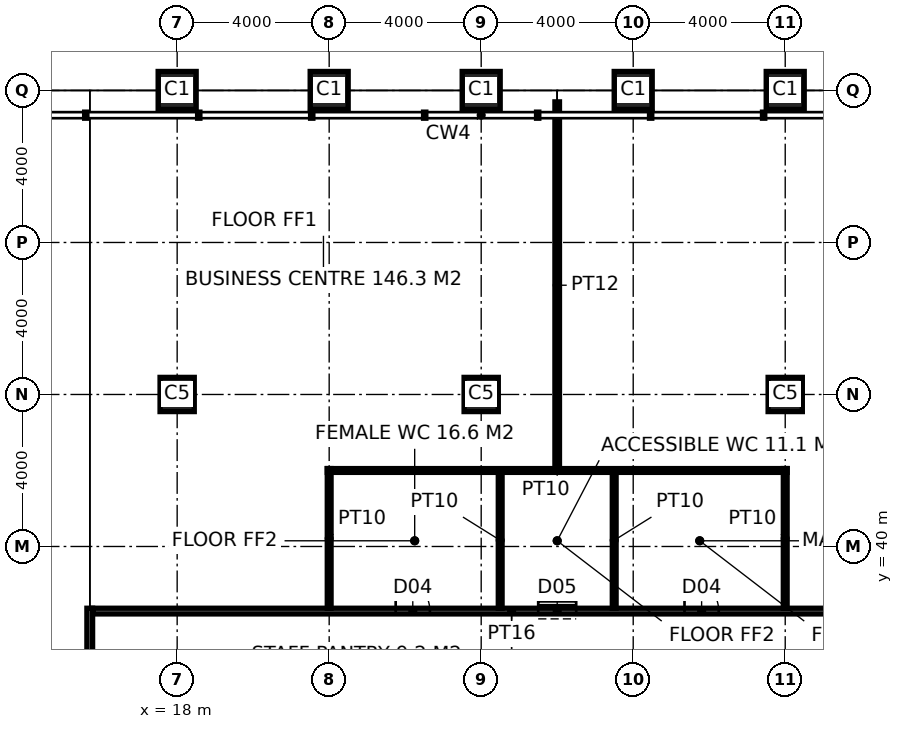
"""IFC4 building model, lengths in metres.
Left out: names, types, materials, properties, quantities, classifications, styles, units other than length and angle.
Written with IfcOpenShell. Run it as: python <this file> out.ifc"""

import sys

from ifc_helpers import new_model, si_unit, direction, frame, frame_2d, origin, origin_2d, place, context, subcontext, project, spatial, rectangle, hollow_rectangle, extrude, element, fill, save


model = new_model("IFC4")
c1 = context("Model", 3, precision=1e-05, world=origin(), true_north=direction((0.0, 1.0)))
c2 = subcontext(c1, "Body", "Model", "MODEL_VIEW")
j1 = project(units=[si_unit("LENGTHUNIT", "METRE"), si_unit("PLANEANGLEUNIT", "RADIAN")], contexts=[c1])
p1 = place(None, origin())
s1 = spatial("IfcSite", under=j1, at=p1, CompositionType="ELEMENT")
p2 = place(p1, origin())
s2 = spatial("IfcBuilding", under=s1, at=p2, CompositionType="ELEMENT")
p3 = place(p2, frame((0.0, 0.0, 142.8)))
s3 = spatial("IfcBuildingStorey", under=s2, at=p3, CompositionType="ELEMENT", Elevation=142.8)
for number, where, z_axis, x_axis in (
    (1, (18.0, 52.0, 0.0), (0.0, 0.0, 1.0), (1.0, 0.0, 0.0)),
    (2, (22.0, 52.0, 0.0), (0.0, 0.0, 1.0), (1.0, 0.0, 0.0)),
    (3, (26.0, 52.0, 0.0), (0.0, 0.0, 1.0), (1.0, 0.0, 0.0)),
    (4, (30.0, 52.0, 0.0), (0.0, 0.0, 1.0), (1.0, 0.0, 0.0)),
    (5, (34.0, 52.0, 0.0), (0.0, 0.0, 1.0), (1.0, 0.0, 0.0)),
):
    element("IfcColumn", number, at=place(p3, frame(where, z_axis=z_axis, x_axis=x_axis)), inside=s3, PredefinedType="COLUMN", context=c2, shape_type="SweptSolid", body=[
        extrude(hollow_rectangle(XDim=1.0, YDim=1.0, WallThickness=0.1, at=origin_2d()), origin(), (0.0, 0.0, 1.0), 5.0),
    ])
for number, where, z_axis, x_axis in (
    (6, (18.0, 44.0, 0.0), (0.0, 0.0, 1.0), (1.0, 0.0, 0.0)),
    (7, (26.0, 44.0, 0.0), (0.0, 0.0, 1.0), (1.0, 0.0, 0.0)),
    (8, (34.0, 44.0, 0.0), (0.0, 0.0, 1.0), (1.0, 0.0, 0.0)),
):
    element("IfcColumn", number, at=place(p3, frame(where, z_axis=z_axis, x_axis=x_axis)), inside=s3, PredefinedType="COLUMN", context=c2, shape_type="SweptSolid", body=[
        extrude(hollow_rectangle(XDim=0.9, YDim=0.9, WallThickness=0.1, at=origin_2d()), origin(), (0.0, 0.0, 1.0), 5.0),
    ])
p4 = place(p3, frame((15.7, 15.625, 0.0), z_axis=(0.0, 0.0, 1.0), x_axis=(0.0, 1.0, 0.0)))
e9 = element("IfcWall", 9, at=p4, inside=s3, PredefinedType="PARTITIONING", context=c2, shape_type="SweptSolid", body=[
    extrude(rectangle(XDim=22.75, YDim=0.15, at=frame_2d((11.375, 0.0))), origin(), (0.0, 0.0, 1.0), 4.85),
])
p5 = place(p4, frame((10.575, 0.0, 0.0)))
e10 = element("IfcOpeningElement", 10, at=p5, cuts=e9, PredefinedType="OPENING", context=c2, shape_type="SweptSolid", body=[
    extrude(rectangle(XDim=1.6, YDim=2.7, at=frame_2d((0.8, 1.35))), frame((0.0, 0.085, 0.0), z_axis=(0.0, -1.0, 0.0), x_axis=(1.0, 0.0, 0.0)), (0.0, 0.0, 1.0), 0.17),
])
p6 = place(p3, frame((15.775, 38.3, 0.0), z_axis=(0.0, 0.0, 1.0), x_axis=(1.0, 0.0, 0.0)))
e11 = element("IfcWall", 11, at=p6, inside=s3, PredefinedType="PARTITIONING", context=c2, shape_type="SweptSolid", body=[
    extrude(rectangle(XDim=22.05, YDim=0.15, at=frame_2d((11.025, 0.0))), origin(), (0.0, 0.0, 1.0), 4.85),
])
p7 = place(p6, frame((7.975, 0.0, 0.0)))
e12 = element("IfcOpeningElement", 12, at=p7, cuts=e11, PredefinedType="OPENING", context=c2, shape_type="SweptSolid", body=[
    extrude(rectangle(XDim=0.9, YDim=2.1, at=frame_2d((0.45, 1.05))), frame((0.0, 0.085, 0.0), z_axis=(0.0, -1.0, 0.0), x_axis=(1.0, 0.0, 0.0)), (0.0, 0.0, 1.0), 0.17),
])
p8 = place(p6, frame((11.725, 0.0, 0.0)))
e13 = element("IfcOpeningElement", 13, at=p8, cuts=e11, PredefinedType="OPENING", context=c2, shape_type="SweptSolid", body=[
    extrude(rectangle(XDim=1.0, YDim=2.1, at=frame_2d((0.5, 1.05))), frame((0.0, 0.085, 0.0), z_axis=(0.0, -1.0, 0.0), x_axis=(1.0, 0.0, 0.0)), (0.0, 0.0, 1.0), 0.17),
])
p9 = place(p6, frame((15.575, 0.0, 0.0)))
e14 = element("IfcOpeningElement", 14, at=p9, cuts=e11, PredefinedType="OPENING", context=c2, shape_type="SweptSolid", body=[
    extrude(rectangle(XDim=0.9, YDim=2.1, at=frame_2d((0.45, 1.05))), frame((0.0, 0.085, 0.0), z_axis=(0.0, -1.0, 0.0), x_axis=(1.0, 0.0, 0.0)), (0.0, 0.0, 1.0), 0.17),
])
for number, where, z_axis, x_axis in (
    (15, (22.0, 38.375, 0.0), (0.0, 0.0, 1.0), (0.0, 1.0, 0.0)),
    (16, (34.0, 38.375, 0.0), (0.0, 0.0, 1.0), (0.0, 1.0, 0.0)),
):
    element("IfcWall", number, at=place(p3, frame(where, z_axis=z_axis, x_axis=x_axis)), inside=s3, PredefinedType="PARTITIONING", context=c2, shape_type="SweptSolid", body=[
        extrude(rectangle(XDim=3.675, YDim=0.1, at=frame_2d((1.837, 0.0))), origin(), (0.0, 0.0, 1.0), 3.95),
    ])
p10 = place(p3, frame((21.95, 42.0, 0.0), z_axis=(0.0, 0.0, 1.0), x_axis=(1.0, 0.0, 0.0)))
e17 = element("IfcWall", 17, at=p10, inside=s3, PredefinedType="PARTITIONING", context=c2, shape_type="SweptSolid", body=[
    extrude(rectangle(XDim=12.1, YDim=0.1, at=frame_2d((6.05, 0.0))), origin(), (0.0, 0.0, 1.0), 4.85),
])
for number, where, z_axis, x_axis in (
    (18, (26.5, 38.375, 0.0), (0.0, 0.0, 1.0), (0.0, 1.0, 0.0)),
    (19, (29.5, 38.375, 0.0), (0.0, 0.0, 1.0), (0.0, 1.0, 0.0)),
):
    element("IfcWall", number, at=place(p3, frame(where, z_axis=z_axis, x_axis=x_axis)), inside=s3, PredefinedType="PARTITIONING", context=c2, shape_type="SweptSolid", body=[
        extrude(rectangle(XDim=3.575, YDim=0.1, at=frame_2d((1.788, 0.0))), origin(), (0.0, 0.0, 1.0), 4.85),
    ])
p11 = place(p3, frame((28.0, 42.05, 0.0), z_axis=(0.0, 0.0, 1.0), x_axis=(0.0, 1.0, 0.0)))
e20 = element("IfcWall", 20, at=p11, inside=s3, PredefinedType="PARTITIONING", context=c2, shape_type="SweptSolid", body=[
    extrude(rectangle(XDim=9.65, YDim=0.12, at=frame_2d((4.825, 0.0))), origin(), (0.0, 0.0, 1.0), 4.85),
])
p12 = place(p7, origin())
e21 = element("IfcDoor", 21, at=p12, inside=s3, OperationType="SINGLE_SWING_LEFT", PredefinedType="DOOR", context=c2, shape_type="SweptSolid", body=[
    extrude(rectangle(XDim=0.9, YDim=2.1, at=frame_2d((0.45, 1.05))), frame((0.0, 0.025, 0.0), z_axis=(0.0, -1.0, 0.0), x_axis=(1.0, 0.0, 0.0)), (0.0, 0.0, 1.0), 0.05),
])
fill(e12, e21)
p13 = place(p8, origin())
e22 = element("IfcDoor", 22, at=p13, inside=s3, OperationType="SLIDING_TO_LEFT", PredefinedType="DOOR", context=c2, shape_type="SweptSolid", body=[
    extrude(rectangle(XDim=1.0, YDim=2.1, at=frame_2d((0.5, 1.05))), frame((0.0, 0.025, 0.0), z_axis=(0.0, -1.0, 0.0), x_axis=(1.0, 0.0, 0.0)), (0.0, 0.0, 1.0), 0.05),
])
fill(e13, e22)
p14 = place(p9, origin())
e23 = element("IfcDoor", 23, at=p14, inside=s3, OperationType="SINGLE_SWING_LEFT", PredefinedType="DOOR", context=c2, shape_type="SweptSolid", body=[
    extrude(rectangle(XDim=0.9, YDim=2.1, at=frame_2d((0.45, 1.05))), frame((0.0, 0.025, 0.0), z_axis=(0.0, -1.0, 0.0), x_axis=(1.0, 0.0, 0.0)), (0.0, 0.0, 1.0), 0.05),
])
fill(e14, e23)
save(model, sys.argv[1])
